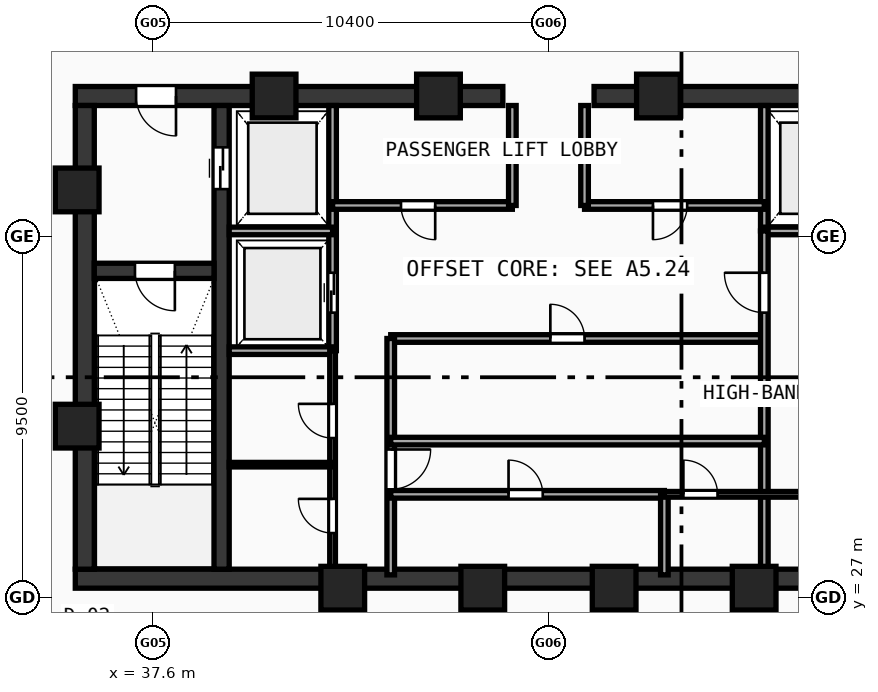
"""IFC4 building model, lengths in metres.
Left out: names, types, materials, properties, quantities, classifications, styles, units other than length and angle.
Written with IfcOpenShell. Run it as: python <this file> out.ifc"""

import sys

from ifc_helpers import new_model, si_unit, direction, frame, frame_2d, origin, origin_with_axes, origin_2d, place, context, subcontext, project, spatial, rectangle, hollow_rectangle, extrude, source, transform, mapped, element, fill, save


model = new_model("IFC4")
c1 = context("Model", 3, precision=1e-05, world=origin(), true_north=direction((0.0, 1.0)))
c2 = subcontext(c1, "Body", "Model", "MODEL_VIEW")
j1 = project(units=[si_unit("LENGTHUNIT", "METRE"), si_unit("PLANEANGLEUNIT", "RADIAN")], contexts=[c1])
p1 = place(None, origin())
s1 = spatial("IfcSite", under=j1, at=p1, CompositionType="ELEMENT")
p2 = place(p1, origin())
s2 = spatial("IfcBuilding", under=s1, at=p2, CompositionType="ELEMENT")
p3 = place(p2, frame((0.0, 0.0, 386.76)))
s3 = spatial("IfcBuildingStorey", under=s2, at=p3, CompositionType="ELEMENT", Elevation=386.76)
p4 = place(p3, frame((35.55, 27.5, 0.0), z_axis=(0.0, 0.0, 1.0), x_axis=(1.0, 0.0, 0.0)))
e1 = element("IfcWall", 1, at=p4, inside=s3, PredefinedType="SHEAR", context=c2, shape_type="SweptSolid", body=[
    extrude(rectangle(XDim=24.9, YDim=0.5, at=frame_2d((12.45, 0.0))), origin(), (0.0, 0.0, 1.0), 4.72),
])
p5 = place(p3, frame((35.55, 40.2, 0.0), z_axis=(0.0, 0.0, 1.0), x_axis=(1.0, 0.0, 0.0)))
e2 = element("IfcWall", 2, at=p5, inside=s3, PredefinedType="SHEAR", context=c2, shape_type="SweptSolid", body=[
    extrude(rectangle(XDim=11.25, YDim=0.5, at=frame_2d((5.625, 0.0))), origin(), (0.0, 0.0, 1.0), 4.72),
])
p6 = place(p5, frame((1.6, 0.0, 0.0)))
e3 = element("IfcOpeningElement", 3, at=p6, cuts=e2, PredefinedType="OPENING", context=c2, shape_type="SweptSolid", body=[
    extrude(rectangle(XDim=1.05, YDim=2.1, at=frame_2d((0.525, 1.05))), frame((0.0, 0.26, 0.0), z_axis=(0.0, -1.0, 0.0), x_axis=(1.0, 0.0, 0.0)), (0.0, 0.0, 1.0), 0.52),
])
p7 = place(p3, frame((49.2, 40.2, 0.0), z_axis=(0.0, 0.0, 1.0), x_axis=(1.0, 0.0, 0.0)))
e4 = element("IfcWall", 4, at=p7, inside=s3, PredefinedType="SHEAR", context=c2, shape_type="SweptSolid", body=[
    extrude(rectangle(XDim=11.25, YDim=0.5, at=frame_2d((5.625, 0.0))), origin(), (0.0, 0.0, 1.0), 4.72),
])
p8 = place(p7, frame((8.6, 0.0, 0.0)))
e5 = element("IfcOpeningElement", 5, at=p8, cuts=e4, PredefinedType="OPENING", context=c2, shape_type="SweptSolid", body=[
    extrude(rectangle(XDim=1.05, YDim=2.1, at=frame_2d((0.525, 1.05))), frame((0.0, 0.26, 0.0), z_axis=(0.0, -1.0, 0.0), x_axis=(1.0, 0.0, 0.0)), (0.0, 0.0, 1.0), 0.52),
])
p9 = place(p3, frame((35.8, 27.75, 0.0), z_axis=(0.0, 0.0, 1.0), x_axis=(0.0, 1.0, 0.0)))
e6 = element("IfcWall", 6, at=p9, inside=s3, PredefinedType="SHEAR", context=c2, shape_type="SweptSolid", body=[
    extrude(rectangle(XDim=12.2, YDim=0.5, at=frame_2d((6.1, 0.0))), origin(), (0.0, 0.0, 1.0), 4.72),
])
p10 = place(p3, frame((39.4, 27.75, 0.0), z_axis=(0.0, 0.0, 1.0), x_axis=(0.0, 1.0, 0.0)))
e7 = element("IfcWall", 7, at=p10, inside=s3, PredefinedType="SHEAR", context=c2, shape_type="SweptSolid", body=[
    extrude(rectangle(XDim=12.2, YDim=0.4, at=frame_2d((6.1, 0.0))), origin(), (0.0, 0.0, 1.0), 4.72),
])
p11 = place(p10, frame((10.0, 0.0, 0.0)))
e8 = element("IfcOpeningElement", 8, at=p11, cuts=e7, PredefinedType="OPENING", context=c2, shape_type="SweptSolid", body=[
    extrude(rectangle(XDim=1.1, YDim=2.1, at=frame_2d((0.55, 1.05))), frame((0.0, 0.21, 0.0), z_axis=(0.0, -1.0, 0.0), x_axis=(1.0, 0.0, 0.0)), (0.0, 0.0, 1.0), 0.42),
])
p12 = place(p3, frame((36.05, 35.6, 0.0), z_axis=(0.0, 0.0, 1.0), x_axis=(1.0, 0.0, 0.0)))
e9 = element("IfcWall", 9, at=p12, inside=s3, PredefinedType="SHEAR", context=c2, shape_type="SweptSolid", body=[
    extrude(rectangle(XDim=3.15, YDim=0.4, at=frame_2d((1.575, 0.0))), origin(), (0.0, 0.0, 1.0), 4.72),
])
p13 = place(p12, frame((1.07, 0.0, 0.0)))
e10 = element("IfcOpeningElement", 10, at=p13, cuts=e9, PredefinedType="OPENING", context=c2, shape_type="SweptSolid", body=[
    extrude(rectangle(XDim=1.05, YDim=2.1, at=frame_2d((0.525, 1.05))), frame((0.0, 0.21, 0.0), z_axis=(0.0, -1.0, 0.0), x_axis=(1.0, 0.0, 0.0)), (0.0, 0.0, 1.0), 0.42),
])
m1 = source(origin(), c2, "Body", "SweptSolid", [
    extrude(hollow_rectangle(XDim=1.15, YDim=1.15, WallThickness=0.048, at=origin_2d()), origin(), (0.0, 0.0, 1.0), 5.0),
])
for number, where, z_axis, x_axis in (
    (11, (42.588, 27.25, -0.28), (0.0, 0.0, 1.0), (1.0, 0.0, 0.0)),
    (12, (46.272, 27.25, -0.28), (0.0, 0.0, 1.0), (1.0, 0.0, 0.0)),
    (13, (49.729, 27.25, -0.28), (0.0, 0.0, 1.0), (1.0, 0.0, 0.0)),
    (14, (53.412, 27.25, -0.28), (0.0, 0.0, 1.0), (1.0, 0.0, 0.0)),
    (15, (50.894, 40.2, -0.28), (0.0, 0.0, 1.0), (1.0, 0.0, 0.0)),
    (16, (45.106, 40.2, -0.28), (0.0, 0.0, 1.0), (1.0, 0.0, 0.0)),
    (17, (40.781, 40.2, -0.28), (0.0, 0.0, 1.0), (1.0, 0.0, 0.0)),
    (18, (35.6, 37.729, -0.28), (0.0, 0.0, 1.0), (1.0, 0.0, 0.0)),
    (19, (35.6, 31.513, -0.28), (0.0, 0.0, 1.0), (1.0, 0.0, 0.0)),
):
    element("IfcColumn", number, at=place(p3, frame(where, z_axis=z_axis, x_axis=x_axis)), inside=s3, PredefinedType="COLUMN", context=c2, shape_type="MappedRepresentation", body=[
        mapped(m1, transform((0.0, 0.0, 0.0), scale=1.0)),
    ])
p14 = place(p3, frame((42.32, 33.5, 0.0), z_axis=(0.0, 0.0, 1.0), x_axis=(0.0, 1.0, 0.0)))
e20 = element("IfcWall", 20, at=p14, inside=s3, PredefinedType="SOLIDWALL", context=c2, shape_type="SweptSolid", body=[
    extrude(rectangle(XDim=6.45, YDim=0.2, at=frame_2d((3.225, 0.0))), origin(), (0.0, 0.0, 1.0), 4.72),
])
p15 = place(p14, frame((1.0, 0.0, 0.0)))
e21 = element("IfcOpeningElement", 21, at=p15, cuts=e20, PredefinedType="OPENING", context=c2, shape_type="SweptSolid", body=[
    extrude(rectangle(XDim=1.05, YDim=2.1, at=frame_2d((0.525, 1.05))), frame((0.0, 0.11, 0.0), z_axis=(0.0, -1.0, 0.0), x_axis=(1.0, 0.0, 0.0)), (0.0, 0.0, 1.0), 0.22),
])
for number, where, z_axis, x_axis in (
    (22, (39.6, 36.65, 0.0), (0.0, 0.0, 1.0), (1.0, 0.0, 0.0)),
    (23, (39.6, 33.5, 0.0), (0.0, 0.0, 1.0), (1.0, 0.0, 0.0)),
):
    element("IfcWall", number, at=place(p3, frame(where, z_axis=z_axis, x_axis=x_axis)), inside=s3, PredefinedType="SOLIDWALL", context=c2, shape_type="SweptSolid", body=[
        extrude(rectangle(XDim=2.72, YDim=0.2, at=frame_2d((1.36, 0.0))), origin(), (0.0, 0.0, 1.0), 4.72),
    ])
p16 = place(p3, frame((53.68, 36.65, 0.0), z_axis=(0.0, 0.0, 1.0), x_axis=(0.0, 1.0, 0.0)))
e24 = element("IfcWall", 24, at=p16, inside=s3, PredefinedType="SOLIDWALL", context=c2, shape_type="SweptSolid", body=[
    extrude(rectangle(XDim=3.3, YDim=0.2, at=frame_2d((1.65, 0.0))), origin(), (0.0, 0.0, 1.0), 4.72),
])
p17 = place(p3, frame((53.68, 36.65, 0.0), z_axis=(0.0, 0.0, 1.0), x_axis=(1.0, 0.0, 0.0)))
e25 = element("IfcWall", 25, at=p17, inside=s3, PredefinedType="SOLIDWALL", context=c2, shape_type="SweptSolid", body=[
    extrude(rectangle(XDim=2.72, YDim=0.2, at=frame_2d((1.36, 0.0))), origin(), (0.0, 0.0, 1.0), 4.72),
])
p18 = place(p3, frame((42.32, 37.32, 0.0), z_axis=(0.0, 0.0, 1.0), x_axis=(1.0, 0.0, 0.0)))
e26 = element("IfcWall", 26, at=p18, inside=s3, PredefinedType="SOLIDWALL", context=c2, shape_type="SweptSolid", body=[
    extrude(rectangle(XDim=4.73, YDim=0.2, at=frame_2d((2.365, 0.0))), origin(), (0.0, 0.0, 1.0), 4.72),
])
p19 = place(p18, frame((1.8, 0.0, 0.0)))
e27 = element("IfcOpeningElement", 27, at=p19, cuts=e26, PredefinedType="OPENING", context=c2, shape_type="SweptSolid", body=[
    extrude(rectangle(XDim=0.9, YDim=2.1, at=frame_2d((0.45, 1.05))), frame((0.0, 0.11, 0.0), z_axis=(0.0, -1.0, 0.0), x_axis=(1.0, 0.0, 0.0)), (0.0, 0.0, 1.0), 0.22),
])
p20 = place(p3, frame((48.95, 37.32, 0.0), z_axis=(0.0, 0.0, 1.0), x_axis=(1.0, 0.0, 0.0)))
e28 = element("IfcWall", 28, at=p20, inside=s3, PredefinedType="SOLIDWALL", context=c2, shape_type="SweptSolid", body=[
    extrude(rectangle(XDim=4.73, YDim=0.2, at=frame_2d((2.365, 0.0))), origin(), (0.0, 0.0, 1.0), 4.72),
])
p21 = place(p20, frame((1.8, 0.0, 0.0)))
e29 = element("IfcOpeningElement", 29, at=p21, cuts=e28, PredefinedType="OPENING", context=c2, shape_type="SweptSolid", body=[
    extrude(rectangle(XDim=0.9, YDim=2.1, at=frame_2d((0.45, 1.05))), frame((0.0, 0.11, 0.0), z_axis=(0.0, -1.0, 0.0), x_axis=(1.0, 0.0, 0.0)), (0.0, 0.0, 1.0), 0.22),
])
for number, where, z_axis, x_axis in (
    (30, (47.05, 37.32, 0.0), (0.0, 0.0, 1.0), (0.0, 1.0, 0.0)),
    (31, (48.95, 37.32, 0.0), (0.0, 0.0, 1.0), (0.0, 1.0, 0.0)),
):
    element("IfcWall", number, at=place(p3, frame(where, z_axis=z_axis, x_axis=x_axis)), inside=s3, PredefinedType="SOLIDWALL", context=c2, shape_type="SweptSolid", body=[
        extrude(rectangle(XDim=2.63, YDim=0.2, at=frame_2d((1.315, 0.0))), origin(), (0.0, 0.0, 1.0), 4.72),
    ])
p22 = place(p3, frame((43.85, 33.82, 0.0), z_axis=(0.0, 0.0, 1.0), x_axis=(1.0, 0.0, 0.0)))
e32 = element("IfcWall", 32, at=p22, inside=s3, PredefinedType="SOLIDWALL", context=c2, shape_type="SweptSolid", body=[
    extrude(rectangle(XDim=9.83, YDim=0.2, at=frame_2d((4.915, 0.0))), origin(), (0.0, 0.0, 1.0), 4.72),
])
p23 = place(p22, frame((4.2, 0.0, 0.0)))
e33 = element("IfcOpeningElement", 33, at=p23, cuts=e32, PredefinedType="OPENING", context=c2, shape_type="SweptSolid", body=[
    extrude(rectangle(XDim=0.9, YDim=2.1, at=frame_2d((0.45, 1.05))), frame((0.0, 0.11, 0.0), z_axis=(0.0, -1.0, 0.0), x_axis=(1.0, 0.0, 0.0)), (0.0, 0.0, 1.0), 0.22),
])
p24 = place(p3, frame((43.85, 27.6, 0.0), z_axis=(0.0, 0.0, 1.0), x_axis=(0.0, 1.0, 0.0)))
e34 = element("IfcWall", 34, at=p24, inside=s3, PredefinedType="SOLIDWALL", context=c2, shape_type="SweptSolid", body=[
    extrude(rectangle(XDim=6.22, YDim=0.2, at=frame_2d((3.11, 0.0))), origin(), (0.0, 0.0, 1.0), 4.72),
])
p25 = place(p24, frame((2.25, 0.0, 0.0)))
e35 = element("IfcOpeningElement", 35, at=p25, cuts=e34, PredefinedType="OPENING", context=c2, shape_type="SweptSolid", body=[
    extrude(rectangle(XDim=1.05, YDim=2.1, at=frame_2d((0.525, 1.05))), frame((0.0, 0.11, 0.0), z_axis=(0.0, -1.0, 0.0), x_axis=(1.0, 0.0, 0.0)), (0.0, 0.0, 1.0), 0.22),
])
p26 = place(p3, frame((53.68, 27.6, 0.0), z_axis=(0.0, 0.0, 1.0), x_axis=(0.0, 1.0, 0.0)))
e36 = element("IfcWall", 36, at=p26, inside=s3, PredefinedType="SOLIDWALL", context=c2, shape_type="SweptSolid", body=[
    extrude(rectangle(XDim=9.05, YDim=0.2, at=frame_2d((4.525, 0.0))), origin(), (0.0, 0.0, 1.0), 4.72),
])
p27 = place(p26, frame((6.9, 0.0, 0.0)))
e37 = element("IfcOpeningElement", 37, at=p27, cuts=e36, PredefinedType="OPENING", context=c2, shape_type="SweptSolid", body=[
    extrude(rectangle(XDim=1.05, YDim=2.1, at=frame_2d((0.525, 1.05))), frame((0.0, 0.11, 0.0), z_axis=(0.0, -1.0, 0.0), x_axis=(1.0, 0.0, 0.0)), (0.0, 0.0, 1.0), 0.22),
])
p28 = place(p3, frame((43.85, 29.72, 0.0), z_axis=(0.0, 0.0, 1.0), x_axis=(1.0, 0.0, 0.0)))
e38 = element("IfcWall", 38, at=p28, inside=s3, PredefinedType="SOLIDWALL", context=c2, shape_type="SweptSolid", body=[
    extrude(rectangle(XDim=7.2, YDim=0.2, at=frame_2d((3.6, 0.0))), origin(), (0.0, 0.0, 1.0), 4.72),
])
p29 = place(p28, frame((3.1, 0.0, 0.0)))
e39 = element("IfcOpeningElement", 39, at=p29, cuts=e38, PredefinedType="OPENING", context=c2, shape_type="SweptSolid", body=[
    extrude(rectangle(XDim=0.9, YDim=2.1, at=frame_2d((0.45, 1.05))), frame((0.0, 0.11, 0.0), z_axis=(0.0, -1.0, 0.0), x_axis=(1.0, 0.0, 0.0)), (0.0, 0.0, 1.0), 0.22),
])
p30 = place(p3, frame((51.05, 27.6, 0.0), z_axis=(0.0, 0.0, 1.0), x_axis=(0.0, 1.0, 0.0)))
e40 = element("IfcWall", 40, at=p30, inside=s3, PredefinedType="SOLIDWALL", context=c2, shape_type="SweptSolid", body=[
    extrude(rectangle(XDim=2.12, YDim=0.2, at=frame_2d((1.06, 0.0))), origin(), (0.0, 0.0, 1.0), 4.72),
])
p31 = place(p3, frame((43.85, 31.12, 0.0), z_axis=(0.0, 0.0, 1.0), x_axis=(1.0, 0.0, 0.0)))
e41 = element("IfcWall", 41, at=p31, inside=s3, PredefinedType="SOLIDWALL", context=c2, shape_type="SweptSolid", body=[
    extrude(rectangle(XDim=9.83, YDim=0.2, at=frame_2d((4.915, 0.0))), origin(), (0.0, 0.0, 1.0), 4.72),
])
p32 = place(p3, frame((42.32, 27.6, 0.0), z_axis=(0.0, 0.0, 1.0), x_axis=(0.0, 1.0, 0.0)))
e42 = element("IfcWall", 42, at=p32, inside=s3, PredefinedType="PARTITIONING", context=c2, shape_type="SweptSolid", body=[
    extrude(rectangle(XDim=5.9, YDim=0.15, at=frame_2d((2.95, 0.0))), origin(), (0.0, 0.0, 1.0), 4.72),
])
p33 = place(p32, frame((1.1, 0.0, 0.0)))
e43 = element("IfcOpeningElement", 43, at=p33, cuts=e42, PredefinedType="OPENING", context=c2, shape_type="SweptSolid", body=[
    extrude(rectangle(XDim=0.9, YDim=2.1, at=frame_2d((0.45, 1.05))), frame((0.0, 0.085, 0.0), z_axis=(0.0, -1.0, 0.0), x_axis=(1.0, 0.0, 0.0)), (0.0, 0.0, 1.0), 0.17),
])
p34 = place(p32, frame((3.6, 0.0, 0.0)))
e44 = element("IfcOpeningElement", 44, at=p34, cuts=e42, PredefinedType="OPENING", context=c2, shape_type="SweptSolid", body=[
    extrude(rectangle(XDim=0.9, YDim=2.1, at=frame_2d((0.45, 1.05))), frame((0.0, 0.085, 0.0), z_axis=(0.0, -1.0, 0.0), x_axis=(1.0, 0.0, 0.0)), (0.0, 0.0, 1.0), 0.17),
])
p35 = place(p3, frame((51.05, 29.72, 0.0), z_axis=(0.0, 0.0, 1.0), x_axis=(1.0, 0.0, 0.0)))
e45 = element("IfcWall", 45, at=p35, inside=s3, PredefinedType="PARTITIONING", context=c2, shape_type="SweptSolid", body=[
    extrude(rectangle(XDim=4.07, YDim=0.15, at=frame_2d((2.035, 0.0))), origin(), (0.0, 0.0, 1.0), 4.72),
])
p36 = place(p35, frame((0.5, 0.0, 0.0)))
e46 = element("IfcOpeningElement", 46, at=p36, cuts=e45, PredefinedType="OPENING", context=c2, shape_type="SweptSolid", body=[
    extrude(rectangle(XDim=0.9, YDim=2.1, at=frame_2d((0.45, 1.05))), frame((0.0, 0.085, 0.0), z_axis=(0.0, -1.0, 0.0), x_axis=(1.0, 0.0, 0.0)), (0.0, 0.0, 1.0), 0.17),
])
p37 = place(p3, frame((39.6, 30.5, 0.0), z_axis=(0.0, 0.0, 1.0), x_axis=(1.0, 0.0, 0.0)))
e47 = element("IfcWall", 47, at=p37, inside=s3, PredefinedType="PARTITIONING", context=c2, shape_type="SweptSolid", body=[
    extrude(rectangle(XDim=2.72, YDim=0.12, at=frame_2d((1.36, 0.0))), origin(), (0.0, 0.0, 1.0), 4.72),
])
m2 = source(origin(), c2, "Body", "SweptSolid", [
    extrude(rectangle(XDim=1.05, YDim=2.1, at=frame_2d((0.525, 1.05))), frame((0.0, 0.025, 0.0), z_axis=(0.0, -1.0, 0.0), x_axis=(1.0, 0.0, 0.0)), (0.0, 0.0, 1.0), 0.05),
])
p38 = place(p13, frame((1.05, 0.0, 0.0), z_axis=(0.0, 0.0, 1.0), x_axis=(-1.0, 0.0, 0.0)))
e48 = element("IfcDoor", 48, at=p38, inside=s3, OperationType="SINGLE_SWING_LEFT", PredefinedType="DOOR", context=c2, shape_type="MappedRepresentation", body=[
    mapped(m2, transform((0.0, 0.0, 0.0), scale=1.0)),
])
fill(e10, e48)
p39 = place(p6, frame((1.05, 0.0, 0.0), z_axis=(0.0, 0.0, 1.0), x_axis=(-1.0, 0.0, 0.0)))
e49 = element("IfcDoor", 49, at=p39, inside=s3, OperationType="SINGLE_SWING_LEFT", PredefinedType="DOOR", context=c2, shape_type="MappedRepresentation", body=[
    mapped(m2, transform((0.0, 0.0, 0.0), scale=1.0)),
])
fill(e3, e49)
m3 = source(origin(), c2, "Body", "SweptSolid", [
    extrude(rectangle(XDim=1.1, YDim=2.1, at=frame_2d((0.55, 1.05))), frame((0.0, 0.025, 0.0), z_axis=(0.0, -1.0, 0.0), x_axis=(1.0, 0.0, 0.0)), (0.0, 0.0, 1.0), 0.05),
])
p40 = place(p11, frame((1.1, 0.0, 0.0), z_axis=(0.0, 0.0, 1.0), x_axis=(-1.0, 0.0, 0.0)))
e50 = element("IfcDoor", 50, at=p40, inside=s3, OperationType="DOUBLE_DOOR_SLIDING", PredefinedType="DOOR", context=c2, shape_type="MappedRepresentation", body=[
    mapped(m3, transform((0.0, 0.0, 0.0), scale=1.0)),
])
fill(e8, e50)
p41 = place(p15, origin_with_axes())
e51 = element("IfcDoor", 51, at=p41, inside=s3, OperationType="DOUBLE_DOOR_SLIDING", PredefinedType="DOOR", context=c2, shape_type="MappedRepresentation", body=[
    mapped(m2, transform((0.0, 0.0, 0.0), scale=1.0)),
])
fill(e21, e51)
m4 = source(origin(), c2, "Body", "SweptSolid", [
    extrude(rectangle(XDim=0.9, YDim=2.1, at=frame_2d((0.45, 1.05))), frame((0.0, 0.025, 0.0), z_axis=(0.0, -1.0, 0.0), x_axis=(1.0, 0.0, 0.0)), (0.0, 0.0, 1.0), 0.05),
])
p42 = place(p19, frame((0.9, 0.0, 0.0), z_axis=(0.0, 0.0, 1.0), x_axis=(-1.0, 0.0, 0.0)))
e52 = element("IfcDoor", 52, at=p42, inside=s3, OperationType="SINGLE_SWING_LEFT", PredefinedType="DOOR", context=c2, shape_type="MappedRepresentation", body=[
    mapped(m4, transform((0.0, 0.0, 0.0), scale=1.0)),
])
fill(e27, e52)
p43 = place(p21, frame((0.9, 0.0, 0.0), z_axis=(0.0, 0.0, 1.0), x_axis=(-1.0, 0.0, 0.0)))
e53 = element("IfcDoor", 53, at=p43, inside=s3, OperationType="SINGLE_SWING_RIGHT", PredefinedType="DOOR", context=c2, shape_type="MappedRepresentation", body=[
    mapped(m4, transform((0.0, 0.0, 0.0), scale=1.0)),
])
fill(e29, e53)
p44 = place(p23, origin_with_axes())
e54 = element("IfcDoor", 54, at=p44, inside=s3, OperationType="SINGLE_SWING_LEFT", PredefinedType="DOOR", context=c2, shape_type="MappedRepresentation", body=[
    mapped(m4, transform((0.0, 0.0, 0.0), scale=1.0)),
])
fill(e33, e54)
p45 = place(p25, frame((1.05, 0.0, 0.0), z_axis=(0.0, 0.0, 1.0), x_axis=(-1.0, 0.0, 0.0)))
e55 = element("IfcDoor", 55, at=p45, inside=s3, OperationType="SINGLE_SWING_LEFT", PredefinedType="DOOR", context=c2, shape_type="MappedRepresentation", body=[
    mapped(m2, transform((0.0, 0.0, 0.0), scale=1.0)),
])
fill(e35, e55)
p46 = place(p27, origin_with_axes())
e56 = element("IfcDoor", 56, at=p46, inside=s3, OperationType="SINGLE_SWING_RIGHT", PredefinedType="DOOR", context=c2, shape_type="MappedRepresentation", body=[
    mapped(m2, transform((0.0, 0.0, 0.0), scale=1.0)),
])
fill(e37, e56)
p47 = place(p29, origin_with_axes())
e57 = element("IfcDoor", 57, at=p47, inside=s3, OperationType="SINGLE_SWING_LEFT", PredefinedType="DOOR", context=c2, shape_type="MappedRepresentation", body=[
    mapped(m4, transform((0.0, 0.0, 0.0), scale=1.0)),
])
fill(e39, e57)
p48 = place(p33, origin_with_axes())
e58 = element("IfcDoor", 58, at=p48, inside=s3, OperationType="SINGLE_SWING_RIGHT", PredefinedType="DOOR", context=c2, shape_type="MappedRepresentation", body=[
    mapped(m4, transform((0.0, 0.0, 0.0), scale=1.0)),
])
fill(e43, e58)
p49 = place(p34, origin_with_axes())
e59 = element("IfcDoor", 59, at=p49, inside=s3, OperationType="SINGLE_SWING_RIGHT", PredefinedType="DOOR", context=c2, shape_type="MappedRepresentation", body=[
    mapped(m4, transform((0.0, 0.0, 0.0), scale=1.0)),
])
fill(e44, e59)
p50 = place(p36, origin_with_axes())
e60 = element("IfcDoor", 60, at=p50, inside=s3, OperationType="SINGLE_SWING_LEFT", PredefinedType="DOOR", context=c2, shape_type="MappedRepresentation", body=[
    mapped(m4, transform((0.0, 0.0, 0.0), scale=1.0)),
])
fill(e46, e60)
save(model, sys.argv[1])
